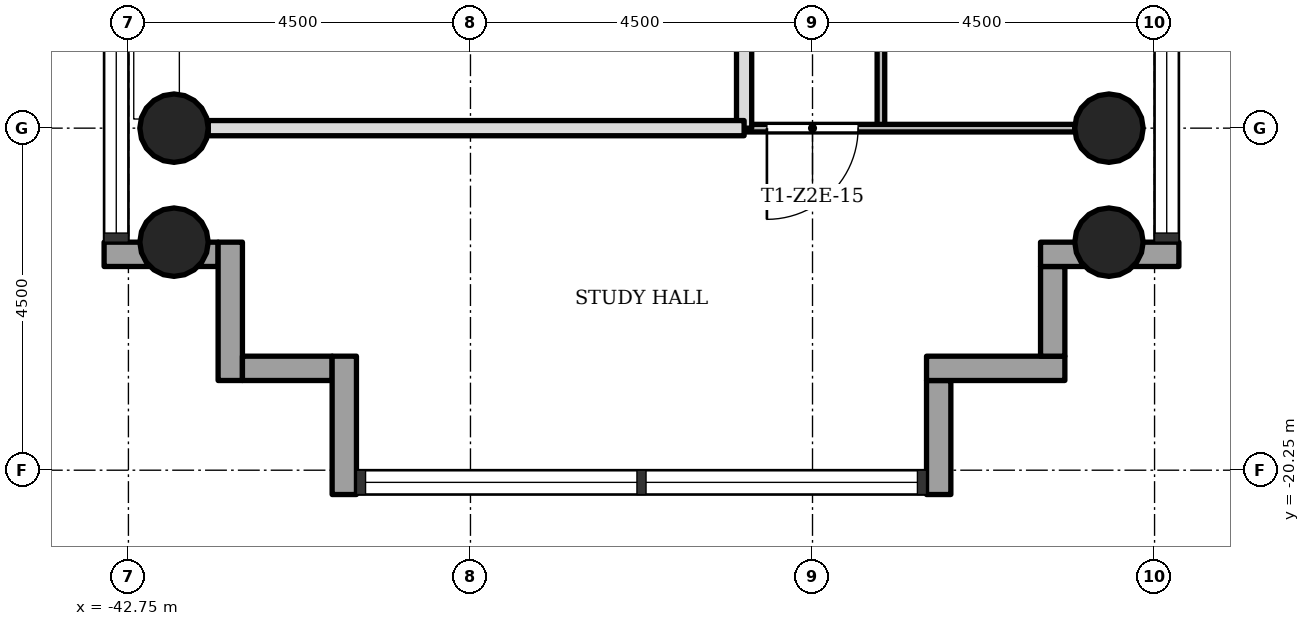
"""IFC4 building model, lengths in metres.
Left out: names, types, materials, properties, quantities, classifications, styles, units other than length and angle.
Written with IfcOpenShell. Run it as: python <this file> out.ifc"""

import sys

from ifc_helpers import new_model, si_unit, direction, frame, frame_2d, origin, origin_2d, place, context, subcontext, project, spatial, rectangle, hollow_circle, extrude, element, fill, save


model = new_model("IFC4")
c1 = context("Model", 3, precision=1e-05, world=origin(), true_north=direction((0.0, 1.0)))
c2 = subcontext(c1, "Body", "Model", "MODEL_VIEW")
j1 = project(units=[si_unit("LENGTHUNIT", "METRE"), si_unit("PLANEANGLEUNIT", "RADIAN")], contexts=[c1])
p1 = place(None, origin())
s1 = spatial("IfcSite", under=j1, at=p1, CompositionType="ELEMENT")
p2 = place(p1, origin())
s2 = spatial("IfcBuilding", under=s1, at=p2, CompositionType="ELEMENT")
p3 = place(p2, frame((0.0, 0.0, 97.0)))
s3 = spatial("IfcBuildingStorey", under=s2, at=p3, CompositionType="ELEMENT", Elevation=97.0)
for number, where, z_axis, x_axis in (
    (1, (-42.15, -15.75, 0.0), (0.0, 0.0, 1.0), (1.0, 0.0, 0.0)),
    (2, (-29.85, -15.75, 0.0), (0.0, 0.0, 1.0), (1.0, 0.0, 0.0)),
    (3, (-42.15, -17.25, 0.0), (0.0, 0.0, 1.0), (1.0, 0.0, 0.0)),
    (4, (-29.85, -17.25, 0.0), (0.0, 0.0, 1.0), (1.0, 0.0, 0.0)),
):
    element("IfcColumn", number, at=place(p3, frame(where, z_axis=z_axis, x_axis=x_axis)), inside=s3, PredefinedType="COLUMN", context=c2, shape_type="SweptSolid", body=[
        extrude(hollow_circle(Radius=0.45, WallThickness=0.032, at=origin_2d()), origin(), (0.0, 0.0, 1.0), 3.4),
    ])
p4 = place(p3, frame((-43.07, -17.41, -0.3), z_axis=(0.0, 0.0, 1.0), x_axis=(1.0, 0.0, 0.0)))
e5 = element("IfcWall", 5, at=p4, inside=s3, PredefinedType="STANDARD", context=c2, shape_type="SweptSolid", body=[
    extrude(rectangle(XDim=1.5, YDim=0.32, at=frame_2d((0.75, 0.0))), origin(), (0.0, 0.0, 1.0), 3.4),
])
p5 = place(p3, frame((-41.41, -17.25, -0.3), z_axis=(0.0, 0.0, 1.0), x_axis=(0.0, -1.0, 0.0)))
e6 = element("IfcWall", 6, at=p5, inside=s3, PredefinedType="STANDARD", context=c2, shape_type="SweptSolid", body=[
    extrude(rectangle(XDim=1.82, YDim=0.32, at=frame_2d((0.91, 0.0))), origin(), (0.0, 0.0, 1.0), 3.4),
])
p6 = place(p3, frame((-41.25, -18.91, -0.3), z_axis=(0.0, 0.0, 1.0), x_axis=(1.0, 0.0, 0.0)))
e7 = element("IfcWall", 7, at=p6, inside=s3, PredefinedType="STANDARD", context=c2, shape_type="SweptSolid", body=[
    extrude(rectangle(XDim=1.18, YDim=0.32, at=frame_2d((0.59, 0.0))), origin(), (0.0, 0.0, 1.0), 3.4),
])
p7 = place(p3, frame((-39.91, -18.75, -0.3), z_axis=(0.0, 0.0, 1.0), x_axis=(0.0, -1.0, 0.0)))
e8 = element("IfcWall", 8, at=p7, inside=s3, PredefinedType="STANDARD", context=c2, shape_type="SweptSolid", body=[
    extrude(rectangle(XDim=1.82, YDim=0.32, at=frame_2d((0.91, 0.0))), origin(), (0.0, 0.0, 1.0), 3.4),
])
p8 = place(p3, frame((-32.09, -20.57, -0.3), z_axis=(0.0, 0.0, 1.0), x_axis=(0.0, 1.0, 0.0)))
e9 = element("IfcWall", 9, at=p8, inside=s3, PredefinedType="STANDARD", context=c2, shape_type="SweptSolid", body=[
    extrude(rectangle(XDim=1.5, YDim=0.32, at=frame_2d((0.75, 0.0))), origin(), (0.0, 0.0, 1.0), 3.4),
])
p9 = place(p3, frame((-32.25, -18.91, -0.3), z_axis=(0.0, 0.0, 1.0), x_axis=(1.0, 0.0, 0.0)))
e10 = element("IfcWall", 10, at=p9, inside=s3, PredefinedType="STANDARD", context=c2, shape_type="SweptSolid", body=[
    extrude(rectangle(XDim=1.82, YDim=0.32, at=frame_2d((0.91, 0.0))), origin(), (0.0, 0.0, 1.0), 3.4),
])
p10 = place(p3, frame((-30.59, -18.75, -0.3), z_axis=(0.0, 0.0, 1.0), x_axis=(0.0, 1.0, 0.0)))
e11 = element("IfcWall", 11, at=p10, inside=s3, PredefinedType="STANDARD", context=c2, shape_type="SweptSolid", body=[
    extrude(rectangle(XDim=1.18, YDim=0.32, at=frame_2d((0.59, 0.0))), origin(), (0.0, 0.0, 1.0), 3.4),
])
p11 = place(p3, frame((-30.75, -17.41, -0.3), z_axis=(0.0, 0.0, 1.0), x_axis=(1.0, 0.0, 0.0)))
e12 = element("IfcWall", 12, at=p11, inside=s3, PredefinedType="STANDARD", context=c2, shape_type="SweptSolid", body=[
    extrude(rectangle(XDim=1.82, YDim=0.32, at=frame_2d((0.91, 0.0))), origin(), (0.0, 0.0, 1.0), 3.4),
])
p12 = place(p3, frame((-34.65, -15.75, 0.0), z_axis=(0.0, 0.0, 1.0), x_axis=(0.0, 1.0, 0.0)))
e13 = element("IfcWall", 13, at=p12, inside=s3, PredefinedType="SOLIDWALL", context=c2, shape_type="SweptSolid", body=[
    extrude(rectangle(XDim=7.2, YDim=0.2, at=frame_2d((3.6, 0.0))), origin(), (0.0, 0.0, 1.0), 3.0),
])
p13 = place(p12, frame((1.95, 0.0, 0.0)))
e14 = element("IfcOpeningElement", 14, at=p13, cuts=e13, PredefinedType="OPENING", context=c2, shape_type="SweptSolid", body=[
    extrude(rectangle(XDim=0.9, YDim=2.1, at=frame_2d((0.45, 1.05))), frame((0.0, 0.11, 0.0), z_axis=(0.0, -1.0, 0.0), x_axis=(1.0, 0.0, 0.0)), (0.0, 0.0, 1.0), 0.22),
])
p14 = place(p3, frame((-32.85, -15.75, 0.0), z_axis=(0.0, 0.0, 1.0), x_axis=(0.0, 1.0, 0.0)))
e15 = element("IfcWall", 15, at=p14, inside=s3, PredefinedType="PARTITIONING", context=c2, shape_type="SweptSolid", body=[
    extrude(rectangle(XDim=9.0, YDim=0.1, at=frame_2d((4.5, 0.0))), origin(), (0.0, 0.0, 1.0), 3.0),
])
p15 = place(p14, frame((5.55, 0.0, 0.0)))
e16 = element("IfcOpeningElement", 16, at=p15, cuts=e15, PredefinedType="OPENING", context=c2, shape_type="SweptSolid", body=[
    extrude(rectangle(XDim=0.9, YDim=2.1, at=frame_2d((0.45, 1.05))), frame((0.0, 0.06, 0.0), z_axis=(0.0, -1.0, 0.0), x_axis=(1.0, 0.0, 0.0)), (0.0, 0.0, 1.0), 0.12),
])
p16 = place(p3, frame((-34.65, -15.75, 0.0), z_axis=(0.0, 0.0, 1.0), x_axis=(1.0, 0.0, 0.0)))
e17 = element("IfcWall", 17, at=p16, inside=s3, PredefinedType="PARTITIONING", context=c2, shape_type="SweptSolid", body=[
    extrude(rectangle(XDim=4.35, YDim=0.1, at=frame_2d((2.175, 0.0))), origin(), (0.0, 0.0, 1.0), 3.0),
])
p17 = place(p16, frame((0.3, 0.0, 0.0)))
e18 = element("IfcOpeningElement", 18, at=p17, cuts=e17, PredefinedType="OPENING", context=c2, shape_type="SweptSolid", body=[
    extrude(rectangle(XDim=1.2, YDim=2.1, at=frame_2d((0.6, 1.05))), frame((0.0, 0.06, 0.0), z_axis=(0.0, -1.0, 0.0), x_axis=(1.0, 0.0, 0.0)), (0.0, 0.0, 1.0), 0.12),
])
p18 = place(p3, frame((-41.7, -15.75, 0.0), z_axis=(0.0, 0.0, 1.0), x_axis=(1.0, 0.0, 0.0)))
e19 = element("IfcWall", 19, at=p18, inside=s3, PredefinedType="SOLIDWALL", context=c2, shape_type="SweptSolid", body=[
    extrude(rectangle(XDim=7.05, YDim=0.2, at=frame_2d((3.525, 0.0))), origin(), (0.0, 0.0, 1.0), 3.0),
])
p19 = place(p17, origin())
e20 = element("IfcDoor", 20, at=p19, inside=s3, OperationType="SINGLE_SWING_LEFT", PredefinedType="DOOR", context=c2, shape_type="SweptSolid", body=[
    extrude(rectangle(XDim=1.2, YDim=2.1, at=frame_2d((0.6, 1.05))), frame((0.0, 0.025, 0.0), z_axis=(0.0, -1.0, 0.0), x_axis=(1.0, 0.0, 0.0)), (0.0, 0.0, 1.0), 0.05),
])
fill(e18, e20)
save(model, sys.argv[1])
